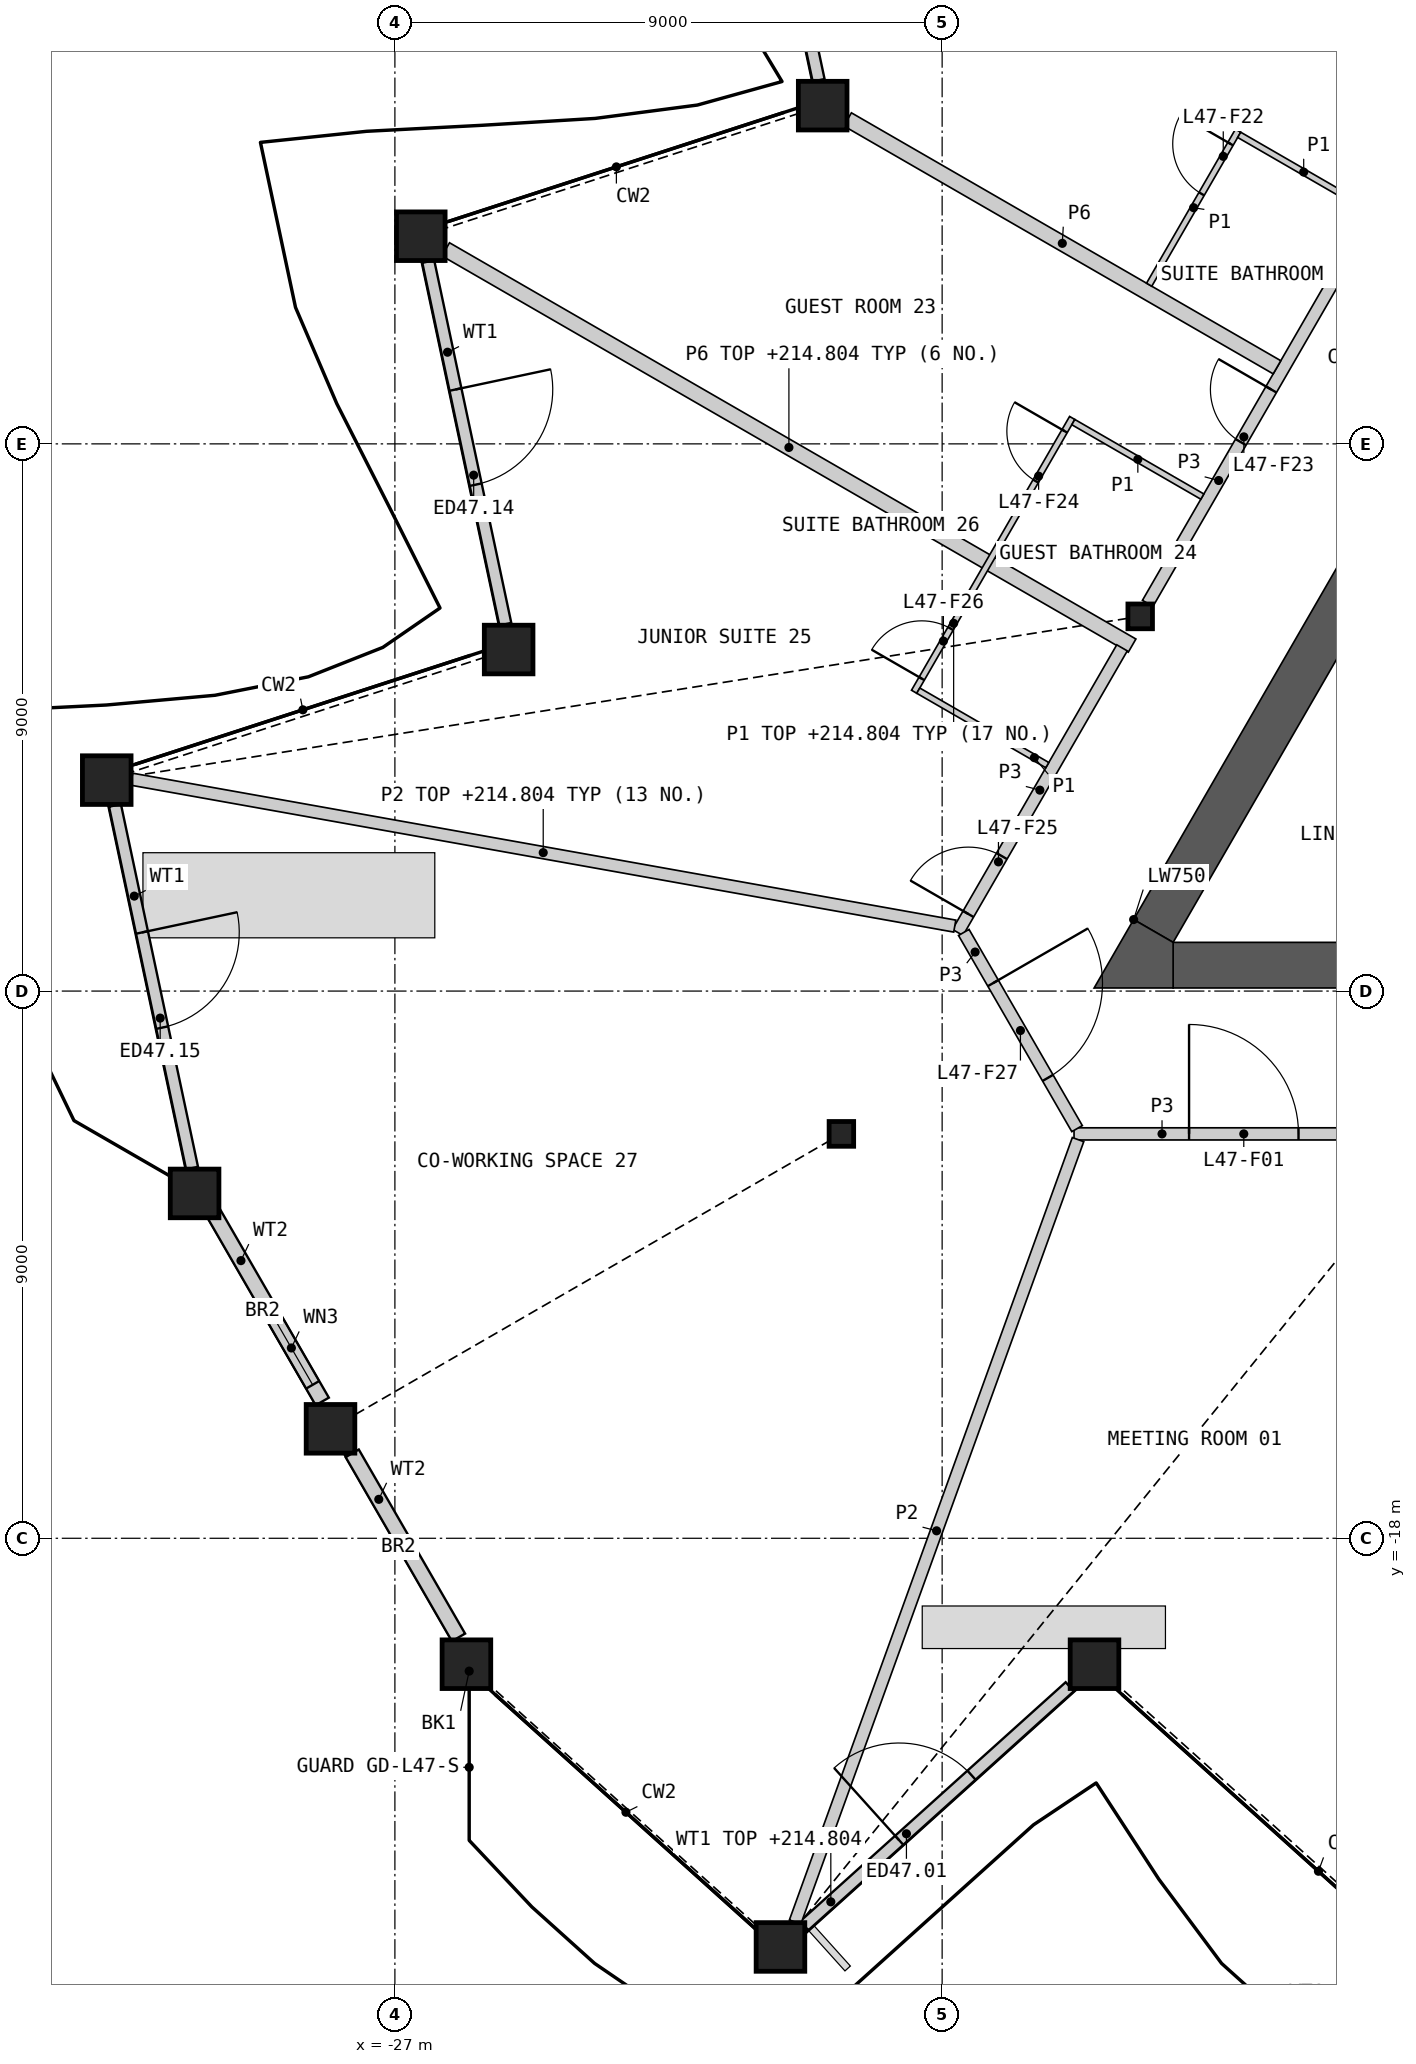
"""IFC4 building model, lengths in metres.
Left out: names, types, materials, properties, quantities, classifications, styles, units other than length and angle.
Written with IfcOpenShell. Run it as: python <this file> out.ifc"""

import sys

from ifc_helpers import new_model, si_unit, direction, frame, frame_2d, origin, origin_2d, place, context, subcontext, project, spatial, polyline, rectangle, hollow_rectangle, i_section, outline, extrude, element, fill, save


model = new_model("IFC4")
c1 = context("Model", 3, precision=1e-05, world=origin(), true_north=direction((0.0, 1.0)))
c2 = subcontext(c1, "Body", "Model", "MODEL_VIEW")
j1 = project(units=[si_unit("LENGTHUNIT", "METRE"), si_unit("PLANEANGLEUNIT", "RADIAN")], contexts=[c1])
p1 = place(None, origin())
s1 = spatial("IfcSite", under=j1, at=p1, CompositionType="ELEMENT")
p2 = place(p1, origin())
s2 = spatial("IfcBuilding", under=s1, at=p2, CompositionType="ELEMENT")
p3 = place(p2, frame((0.0, 0.0, 212.4)))
s3 = spatial("IfcBuildingStorey", under=s2, at=p3, CompositionType="ELEMENT", Elevation=212.4)
for number, where, z_axis, x_axis in (
    (1, (-25.823, -20.071, 0.0), (0.0, 0.0, 1.0), (1.0, 0.0, 0.0)),
    (2, (-20.659, -24.722, 0.0), (0.0, 0.0, 1.0), (1.0, 0.0, 0.0)),
    (3, (-15.494, -20.071, 0.0), (0.0, 0.0, 1.0), (1.0, 0.0, 0.0)),
    (4, (-19.965, 5.563, 0.0), (0.0, 0.0, 1.0), (1.0, 0.0, 0.0)),
    (5, (-26.574, 3.415, 0.0), (0.0, 0.0, 1.0), (1.0, 0.0, 0.0)),
    (6, (-25.129, -3.383, 0.0), (0.0, 0.0, 1.0), (1.0, 0.0, 0.0)),
    (7, (-31.739, -5.53, 0.0), (0.0, 0.0, 1.0), (1.0, 0.0, 0.0)),
    (8, (-30.294, -12.328, 0.0), (0.0, 0.0, 1.0), (1.0, 0.0, 0.0)),
    (9, (-28.059, -16.2, 0.0), (0.0, 0.0, 1.0), (1.0, 0.0, 0.0)),
):
    element("IfcColumn", number, at=place(p3, frame(where, z_axis=z_axis, x_axis=x_axis)), inside=s3, PredefinedType="COLUMN", context=c2, shape_type="SweptSolid", body=[
        extrude(hollow_rectangle(XDim=0.8, YDim=0.8, WallThickness=0.05, at=origin_2d()), origin(), (0.0, 0.0, 1.0), 3.6),
    ])
for number, where, z_axis, x_axis in (
    (10, (-14.743, -2.837, 0.0), (0.0, 0.0, 1.0), (1.0, 0.0, 0.0)),
    (11, (-19.657, -11.349, 0.0), (0.0, 0.0, 1.0), (1.0, 0.0, 0.0)),
):
    element("IfcColumn", number, at=place(p3, frame(where, z_axis=z_axis, x_axis=x_axis)), inside=s3, PredefinedType="COLUMN", context=c2, shape_type="SweptSolid", body=[
        extrude(i_section(OverallWidth=0.404, OverallDepth=0.407, WebThickness=0.027, FlangeThickness=0.044, at=origin_2d()), origin(), (0.0, 0.0, 1.0), 3.6),
    ])
p4 = place(p3, frame((-20.267, -24.373, 0.0), z_axis=(0.0, 0.0, 1.0), x_axis=(0.743163950832, 0.669109364891, 0.0)))
e12 = element("IfcWall", 12, at=p4, inside=s3, PredefinedType="SOLIDWALL", context=c2, shape_type="SweptSolid", body=[
    extrude(rectangle(XDim=5.875, YDim=0.2, at=frame_2d((2.938, 0.0))), origin(), (0.0, 0.0, 1.0), 2.404),
])
p5 = place(p4, frame((2.101, 0.0, 0.0)))
e13 = element("IfcOpeningElement", 13, at=p5, cuts=e12, PredefinedType="OPENING", context=c2, shape_type="SweptSolid", body=[
    extrude(rectangle(XDim=1.6, YDim=2.4, at=frame_2d((0.8, 1.2))), frame((0.0, 0.11, 0.0), z_axis=(0.0, -1.0, 0.0), x_axis=(1.0, 0.0, 0.0)), (0.0, 0.0, 1.0), 0.22),
])
p6 = place(p3, frame((-21.299, 11.944, 0.0), z_axis=(0.0, 0.0, 1.0), x_axis=(0.207912864597, -0.978147351238, 0.0)))
e14 = element("IfcWall", 14, at=p6, inside=s3, PredefinedType="SOLIDWALL", context=c2, shape_type="SweptSolid", body=[
    extrude(rectangle(XDim=6.098, YDim=0.2, at=frame_2d((3.049, 0.0))), origin(), (0.0, 0.0, 1.0), 2.701),
])
p7 = place(p6, frame((2.168, 0.0, 0.0)))
e15 = element("IfcOpeningElement", 15, at=p7, cuts=e14, PredefinedType="OPENING", context=c2, shape_type="SweptSolid", body=[
    extrude(rectangle(XDim=1.6, YDim=2.4, at=frame_2d((0.8, 1.2))), frame((0.0, 0.11, 0.0), z_axis=(0.0, -1.0, 0.0), x_axis=(1.0, 0.0, 0.0)), (0.0, 0.0, 1.0), 0.22),
])
p8 = place(p3, frame((-26.451, 2.999, 0.0), z_axis=(0.0, 0.0, 1.0), x_axis=(0.207912864597, -0.978147351238, 0.0)))
e16 = element("IfcWall", 16, at=p8, inside=s3, PredefinedType="SOLIDWALL", context=c2, shape_type="SweptSolid", body=[
    extrude(rectangle(XDim=6.098, YDim=0.2, at=frame_2d((3.049, 0.0))), origin(), (0.0, 0.0, 1.0), 2.701),
])
p9 = place(p8, frame((2.152, 0.0, 0.0)))
e17 = element("IfcOpeningElement", 17, at=p9, cuts=e16, PredefinedType="OPENING", context=c2, shape_type="SweptSolid", body=[
    extrude(rectangle(XDim=1.6, YDim=2.4, at=frame_2d((0.8, 1.2))), frame((0.0, 0.11, 0.0), z_axis=(0.0, -1.0, 0.0), x_axis=(1.0, 0.0, 0.0)), (0.0, 0.0, 1.0), 0.22),
])
p10 = place(p3, frame((-31.604, -5.947, 0.0), z_axis=(0.0, 0.0, 1.0), x_axis=(0.207912864597, -0.978147351238, 0.0)))
e18 = element("IfcWall", 18, at=p10, inside=s3, PredefinedType="SOLIDWALL", context=c2, shape_type="SweptSolid", body=[
    extrude(rectangle(XDim=6.098, YDim=0.2, at=frame_2d((3.049, 0.0))), origin(), (0.0, 0.0, 1.0), 2.701),
])
p11 = place(p10, frame((2.135, 0.0, 0.0)))
e19 = element("IfcOpeningElement", 19, at=p11, cuts=e18, PredefinedType="OPENING", context=c2, shape_type="SweptSolid", body=[
    extrude(rectangle(XDim=1.6, YDim=2.4, at=frame_2d((0.8, 1.2))), frame((0.0, 0.11, 0.0), z_axis=(0.0, -1.0, 0.0), x_axis=(1.0, 0.0, 0.0)), (0.0, 0.0, 1.0), 0.22),
])
p12 = place(p3, frame((-29.978, -12.662, 0.0), z_axis=(0.0, 0.0, 1.0), x_axis=(0.500004952373, -0.866022544512, 0.0)))
e20 = element("IfcWall", 20, at=p12, inside=s3, PredefinedType="SOLIDWALL", context=c2, shape_type="SweptSolid", body=[
    extrude(rectangle(XDim=3.566, YDim=0.25, at=frame_2d((1.783, 0.0))), origin(), (0.0, 0.0, 1.0), 2.701),
])
p13 = place(p12, frame((1.85, 0.0, 1.7)))
e21 = element("IfcOpeningElement", 21, at=p13, cuts=e20, PredefinedType="OPENING", context=c2, shape_type="SweptSolid", body=[
    extrude(rectangle(XDim=1.4, YDim=0.8, at=frame_2d((0.7, 0.4))), frame((0.0, 0.135, 0.0), z_axis=(0.0, -1.0, 0.0), x_axis=(1.0, 0.0, 0.0)), (0.0, 0.0, 1.0), 0.27),
])
p14 = place(p3, frame((-27.702, -16.603, 0.0), z_axis=(0.0, 0.0, 1.0), x_axis=(0.500006525586, -0.866021636203, 0.0)))
e22 = element("IfcWall", 22, at=p14, inside=s3, PredefinedType="SOLIDWALL", context=c2, shape_type="SweptSolid", body=[
    extrude(rectangle(XDim=3.497, YDim=0.25, at=frame_2d((1.748, 0.0))), origin(), (0.0, 0.0, 1.0), 2.701),
])
p15 = place(p3, frame((-14.201, -8.574, 0.0), z_axis=(0.0, 0.0, 1.0), x_axis=(1.0, 0.0, 0.0)))
e23 = element("IfcWall", 23, at=p15, inside=s3, PredefinedType="SHEAR", context=c2, shape_type="SweptSolid", body=[
    extrude(rectangle(XDim=3.798, YDim=0.75, at=frame_2d((1.899, 0.0))), origin(), (0.0, 0.0, 1.0), 3.25),
])
p16 = place(p3, frame((-9.625, 0.477, 0.0), z_axis=(0.0, 0.0, 1.0), x_axis=(-0.499986234705, -0.866033351035, 0.0)))
e24 = element("IfcWall", 24, at=p16, inside=s3, PredefinedType="SHEAR", context=c2, shape_type="SweptSolid", body=[
    extrude(rectangle(XDim=9.801, YDim=0.75, at=frame_2d((4.9, 0.0))), origin(), (0.0, 0.0, 1.0), 3.25),
])
p17 = place(p3, origin())
e25 = element("IfcWall", 25, at=p17, inside=s3, PredefinedType="SHEAR", context=c2, shape_type="SweptSolid", body=[
    extrude(outline(polyline([(-14.851, -7.824), (-14.201, -8.199), (-14.201, -8.949), (-15.5, -8.949), (-14.851, -7.824)])), origin(), (0.0, 0.0, 1.0), 3.25),
])
p18 = place(p3, frame((-26.164, 3.199, 0.0), z_axis=(0.0, 0.0, 1.0), x_axis=(0.866029635251, -0.499992670813, 0.0)))
e26 = element("IfcWall", 26, at=p18, inside=s3, PredefinedType="PARTITIONING", context=c2, shape_type="SweptSolid", body=[
    extrude(rectangle(XDim=13.035, YDim=0.25, at=frame_2d((6.518, 0.0))), origin(), (0.0, 0.0, 1.0), 2.404),
])
p19 = place(p3, frame((-14.619, -2.624, 0.0), z_axis=(0.0, 0.0, 1.0), x_axis=(0.50000393355, 0.866023132736, 0.0)))
e27 = element("IfcWall", 27, at=p19, inside=s3, PredefinedType="PARTITIONING", context=c2, shape_type="SweptSolid", body=[
    extrude(rectangle(XDim=9.335, YDim=0.2, at=frame_2d((4.667, 0.0))), origin(), (0.0, 0.0, 1.0), 3.25),
])
p20 = place(p19, frame((3.062, 0.0, 0.0)))
e28 = element("IfcOpeningElement", 28, at=p20, cuts=e27, PredefinedType="OPENING", context=c2, shape_type="SweptSolid", body=[
    extrude(rectangle(XDim=1.0, YDim=2.1, at=frame_2d((0.5, 1.05))), frame((0.0, 0.11, 0.0), z_axis=(0.0, -1.0, 0.0), x_axis=(1.0, 0.0, 0.0)), (0.0, 0.0, 1.0), 0.22),
])
p21 = place(p3, frame((-19.555, 5.337, 0.0), z_axis=(0.0, 0.0, 1.0), x_axis=(0.866023543838, -0.500003221507, 0.0)))
e29 = element("IfcWall", 29, at=p21, inside=s3, PredefinedType="PARTITIONING", context=c2, shape_type="SweptSolid", body=[
    extrude(rectangle(XDim=8.154, YDim=0.25, at=frame_2d((4.077, 0.0))), origin(), (0.0, 0.0, 1.0), 2.404),
])
p22 = place(p3, frame((-15.831, -11.349, 0.0), z_axis=(0.0, 0.0, 1.0), x_axis=(1.0, 0.0, 0.0)))
e30 = element("IfcWall", 30, at=p22, inside=s3, PredefinedType="PARTITIONING", context=c2, shape_type="SweptSolid", body=[
    extrude(rectangle(XDim=5.789, YDim=0.2, at=frame_2d((2.894, 0.0))), origin(), (0.0, 0.0, 1.0), 3.25),
])
p23 = place(p22, frame((1.892, 0.0, 0.0)))
e31 = element("IfcOpeningElement", 31, at=p23, cuts=e30, PredefinedType="OPENING", context=c2, shape_type="SweptSolid", body=[
    extrude(rectangle(XDim=1.8, YDim=2.1, at=frame_2d((0.9, 1.05))), frame((0.0, 0.11, 0.0), z_axis=(0.0, -1.0, 0.0), x_axis=(1.0, 0.0, 0.0)), (0.0, 0.0, 1.0), 0.22),
])
p24 = place(p3, frame((-17.744, -8.035, 0.0), z_axis=(0.0, 0.0, 1.0), x_axis=(0.500020937221, 0.866013315337, 0.0)))
e32 = element("IfcWall", 32, at=p24, inside=s3, PredefinedType="PARTITIONING", context=c2, shape_type="SweptSolid", body=[
    extrude(rectangle(XDim=5.405, YDim=0.2, at=frame_2d((2.702, 0.0))), origin(), (0.0, 0.0, 1.0), 3.25),
])
p25 = place(p24, frame((0.35, 0.0, 0.0)))
e33 = element("IfcOpeningElement", 33, at=p25, cuts=e32, PredefinedType="OPENING", context=c2, shape_type="SweptSolid", body=[
    extrude(rectangle(XDim=1.1, YDim=2.1, at=frame_2d((0.55, 1.05))), frame((0.0, 0.11, 0.0), z_axis=(0.0, -1.0, 0.0), x_axis=(1.0, 0.0, 0.0)), (0.0, 0.0, 1.0), 0.22),
])
p26 = place(p3, frame((-17.644, -8.035, 0.0), z_axis=(0.0, 0.0, 1.0), x_axis=(0.499958791762, -0.866049194065, 0.0)))
e34 = element("IfcWall", 34, at=p26, inside=s3, PredefinedType="PARTITIONING", context=c2, shape_type="SweptSolid", body=[
    extrude(rectangle(XDim=3.726, YDim=0.2, at=frame_2d((1.863, 0.0))), origin(), (0.0, 0.0, 1.0), 3.25),
])
p27 = place(p26, frame((0.963, 0.0, 0.0)))
e35 = element("IfcOpeningElement", 35, at=p27, cuts=e34, PredefinedType="OPENING", context=c2, shape_type="SweptSolid", body=[
    extrude(rectangle(XDim=1.8, YDim=2.1, at=frame_2d((0.9, 1.05))), frame((0.0, 0.11, 0.0), z_axis=(0.0, -1.0, 0.0), x_axis=(1.0, 0.0, 0.0)), (0.0, 0.0, 1.0), 0.22),
])
p28 = place(p3, frame((-31.329, -5.515, 0.0), z_axis=(0.0, 0.0, 1.0), x_axis=(0.98444063089, -0.17571751265, 0.0)))
e36 = element("IfcWall", 36, at=p28, inside=s3, PredefinedType="PARTITIONING", context=c2, shape_type="SweptSolid", body=[
    extrude(rectangle(XDim=13.751, YDim=0.2, at=frame_2d((6.875, 0.0))), origin(), (0.0, 0.0, 1.0), 2.404),
])
p29 = place(p3, frame((-20.418, -24.312, 0.0), z_axis=(0.0, 0.0, 1.0), x_axis=(0.340057865258, 0.940404513109, 0.0)))
e37 = element("IfcWall", 37, at=p29, inside=s3, PredefinedType="PARTITIONING", context=c2, shape_type="SweptSolid", body=[
    extrude(rectangle(XDim=13.684, YDim=0.2, at=frame_2d((6.842, 0.0))), origin(), (0.0, 0.0, 1.0), 2.404),
])
p30 = place(p3, frame((-18.461, -4.077, 0.0), z_axis=(0.0, 0.0, 1.0), x_axis=(0.499971721724, 0.866041729639, 0.0)))
e38 = element("IfcWall", 38, at=p30, inside=s3, PredefinedType="PARTITIONING", context=c2, shape_type="SweptSolid", body=[
    extrude(rectangle(XDim=5.2, YDim=0.1, at=frame_2d((2.6, 0.0))), origin(), (0.0, 0.0, 1.0), 2.404),
])
p31 = place(p30, frame((4.0, 0.0, 0.0)))
e39 = element("IfcOpeningElement", 39, at=p31, cuts=e38, PredefinedType="OPENING", context=c2, shape_type="SweptSolid", body=[
    extrude(rectangle(XDim=0.95, YDim=2.1, at=frame_2d((0.475, 1.05))), frame((0.0, 0.06, 0.0), z_axis=(0.0, -1.0, 0.0), x_axis=(1.0, 0.0, 0.0)), (0.0, 0.0, 1.0), 0.12),
])
p32 = place(p30, frame((0.25, 0.0, 0.0)))
e40 = element("IfcOpeningElement", 40, at=p32, cuts=e38, PredefinedType="OPENING", context=c2, shape_type="SweptSolid", body=[
    extrude(rectangle(XDim=0.95, YDim=2.1, at=frame_2d((0.475, 1.05))), frame((0.0, 0.06, 0.0), z_axis=(0.0, -1.0, 0.0), x_axis=(1.0, 0.0, 0.0)), (0.0, 0.0, 1.0), 0.12),
])
p33 = place(p3, frame((-14.595, 2.618, 0.0), z_axis=(0.0, 0.0, 1.0), x_axis=(0.500062034277, 0.865989585315, 0.0)))
e41 = element("IfcWall", 41, at=p33, inside=s3, PredefinedType="PARTITIONING", context=c2, shape_type="SweptSolid", body=[
    extrude(rectangle(XDim=2.925, YDim=0.1, at=frame_2d((1.462, 0.0))), origin(), (0.0, 0.0, 1.0), 2.404),
])
p34 = place(p33, frame((1.725, 0.0, 0.0)))
e42 = element("IfcOpeningElement", 42, at=p34, cuts=e41, PredefinedType="OPENING", context=c2, shape_type="SweptSolid", body=[
    extrude(rectangle(XDim=0.95, YDim=2.1, at=frame_2d((0.475, 1.05))), frame((0.0, 0.06, 0.0), z_axis=(0.0, -1.0, 0.0), x_axis=(1.0, 0.0, 0.0)), (0.0, 0.0, 1.0), 0.12),
])
p35 = place(p3, frame((-18.393, -4.059, 0.0), z_axis=(0.0, 0.0, 1.0), x_axis=(0.866057815567, -0.499943856944, 0.0)))
e43 = element("IfcWall", 43, at=p35, inside=s3, PredefinedType="PARTITIONING", context=c2, shape_type="SweptSolid", body=[
    extrude(rectangle(XDim=2.45, YDim=0.1, at=frame_2d((1.225, 0.0))), origin(), (0.0, 0.0, 1.0), 2.404),
])
p36 = place(p3, frame((-15.843, 0.358, 0.0), z_axis=(0.0, 0.0, 1.0), x_axis=(0.866014668023, -0.500018594424, 0.0)))
e44 = element("IfcWall", 44, at=p36, inside=s3, PredefinedType="PARTITIONING", context=c2, shape_type="SweptSolid", body=[
    extrude(rectangle(XDim=2.45, YDim=0.1, at=frame_2d((1.225, 0.0))), origin(), (0.0, 0.0, 1.0), 2.404),
])
p37 = place(p3, frame((-13.115, 5.083, 0.0), z_axis=(0.0, 0.0, 1.0), x_axis=(0.866032905446, -0.499987006516, 0.0)))
e45 = element("IfcWall", 45, at=p37, inside=s3, PredefinedType="PARTITIONING", context=c2, shape_type="SweptSolid", body=[
    extrude(rectangle(XDim=2.45, YDim=0.1, at=frame_2d((1.225, 0.0))), origin(), (0.0, 0.0, 1.0), 2.404),
])
p38 = place(p5, origin())
e46 = element("IfcDoor", 46, at=p38, inside=s3, OperationType="DOUBLE_DOOR_SINGLE_SWING", PredefinedType="DOOR", context=c2, shape_type="SweptSolid", body=[
    extrude(rectangle(XDim=1.6, YDim=2.4, at=frame_2d((0.8, 1.2))), frame((0.0, 0.025, 0.0), z_axis=(0.0, -1.0, 0.0), x_axis=(1.0, 0.0, 0.0)), (0.0, 0.0, 1.0), 0.05),
])
fill(e13, e46)
p39 = place(p9, origin())
e47 = element("IfcDoor", 47, at=p39, inside=s3, OperationType="DOUBLE_DOOR_SINGLE_SWING", PredefinedType="DOOR", context=c2, shape_type="SweptSolid", body=[
    extrude(rectangle(XDim=1.6, YDim=2.4, at=frame_2d((0.8, 1.2))), frame((0.0, 0.025, 0.0), z_axis=(0.0, -1.0, 0.0), x_axis=(1.0, 0.0, 0.0)), (0.0, 0.0, 1.0), 0.05),
])
fill(e17, e47)
p40 = place(p11, origin())
e48 = element("IfcDoor", 48, at=p40, inside=s3, OperationType="DOUBLE_DOOR_SINGLE_SWING", PredefinedType="DOOR", context=c2, shape_type="SweptSolid", body=[
    extrude(rectangle(XDim=1.6, YDim=2.4, at=frame_2d((0.8, 1.2))), frame((0.0, 0.025, 0.0), z_axis=(0.0, -1.0, 0.0), x_axis=(1.0, 0.0, 0.0)), (0.0, 0.0, 1.0), 0.05),
])
fill(e19, e48)
p41 = place(p13, origin())
e49 = element("IfcWindow", 49, at=p41, inside=s3, PartitioningType="SINGLE_PANEL", PredefinedType="WINDOW", context=c2, shape_type="SweptSolid", body=[
    extrude(rectangle(XDim=1.4, YDim=0.8, at=frame_2d((0.7, 0.4))), frame((0.0, 0.03, 0.0), z_axis=(0.0, -1.0, 0.0), x_axis=(1.0, 0.0, 0.0)), (0.0, 0.0, 1.0), 0.06),
])
fill(e21, e49)
p42 = place(p23, origin())
e50 = element("IfcDoor", 50, at=p42, inside=s3, OperationType="DOUBLE_DOOR_SINGLE_SWING", PredefinedType="DOOR", context=c2, shape_type="SweptSolid", body=[
    extrude(rectangle(XDim=1.8, YDim=2.1, at=frame_2d((0.9, 1.05))), frame((0.0, 0.025, 0.0), z_axis=(0.0, -1.0, 0.0), x_axis=(1.0, 0.0, 0.0)), (0.0, 0.0, 1.0), 0.05),
])
fill(e31, e50)
p43 = place(p34, origin())
e51 = element("IfcDoor", 51, at=p43, inside=s3, OperationType="SINGLE_SWING_RIGHT", PredefinedType="DOOR", context=c2, shape_type="SweptSolid", body=[
    extrude(rectangle(XDim=0.95, YDim=2.1, at=frame_2d((0.475, 1.05))), frame((0.0, 0.025, 0.0), z_axis=(0.0, -1.0, 0.0), x_axis=(1.0, 0.0, 0.0)), (0.0, 0.0, 1.0), 0.05),
])
fill(e42, e51)
p44 = place(p20, origin())
e52 = element("IfcDoor", 52, at=p44, inside=s3, OperationType="SINGLE_SWING_RIGHT", PredefinedType="DOOR", context=c2, shape_type="SweptSolid", body=[
    extrude(rectangle(XDim=1.0, YDim=2.1, at=frame_2d((0.5, 1.05))), frame((0.0, 0.025, 0.0), z_axis=(0.0, -1.0, 0.0), x_axis=(1.0, 0.0, 0.0)), (0.0, 0.0, 1.0), 0.05),
])
fill(e28, e52)
p45 = place(p31, origin())
e53 = element("IfcDoor", 53, at=p45, inside=s3, OperationType="SINGLE_SWING_RIGHT", PredefinedType="DOOR", context=c2, shape_type="SweptSolid", body=[
    extrude(rectangle(XDim=0.95, YDim=2.1, at=frame_2d((0.475, 1.05))), frame((0.0, 0.025, 0.0), z_axis=(0.0, -1.0, 0.0), x_axis=(1.0, 0.0, 0.0)), (0.0, 0.0, 1.0), 0.05),
])
fill(e39, e53)
p46 = place(p25, origin())
e54 = element("IfcDoor", 54, at=p46, inside=s3, OperationType="SINGLE_SWING_LEFT", PredefinedType="DOOR", context=c2, shape_type="SweptSolid", body=[
    extrude(rectangle(XDim=1.1, YDim=2.1, at=frame_2d((0.55, 1.05))), frame((0.0, 0.025, 0.0), z_axis=(0.0, -1.0, 0.0), x_axis=(1.0, 0.0, 0.0)), (0.0, 0.0, 1.0), 0.05),
])
fill(e33, e54)
p47 = place(p32, origin())
e55 = element("IfcDoor", 55, at=p47, inside=s3, OperationType="SINGLE_SWING_LEFT", PredefinedType="DOOR", context=c2, shape_type="SweptSolid", body=[
    extrude(rectangle(XDim=0.95, YDim=2.1, at=frame_2d((0.475, 1.05))), frame((0.0, 0.025, 0.0), z_axis=(0.0, -1.0, 0.0), x_axis=(1.0, 0.0, 0.0)), (0.0, 0.0, 1.0), 0.05),
])
fill(e40, e55)
p48 = place(p27, origin())
e56 = element("IfcDoor", 56, at=p48, inside=s3, OperationType="DOUBLE_DOOR_SINGLE_SWING", PredefinedType="DOOR", context=c2, shape_type="SweptSolid", body=[
    extrude(rectangle(XDim=1.8, YDim=2.1, at=frame_2d((0.9, 1.05))), frame((0.0, 0.025, 0.0), z_axis=(0.0, -1.0, 0.0), x_axis=(1.0, 0.0, 0.0)), (0.0, 0.0, 1.0), 0.05),
])
fill(e35, e56)
save(model, sys.argv[1])
